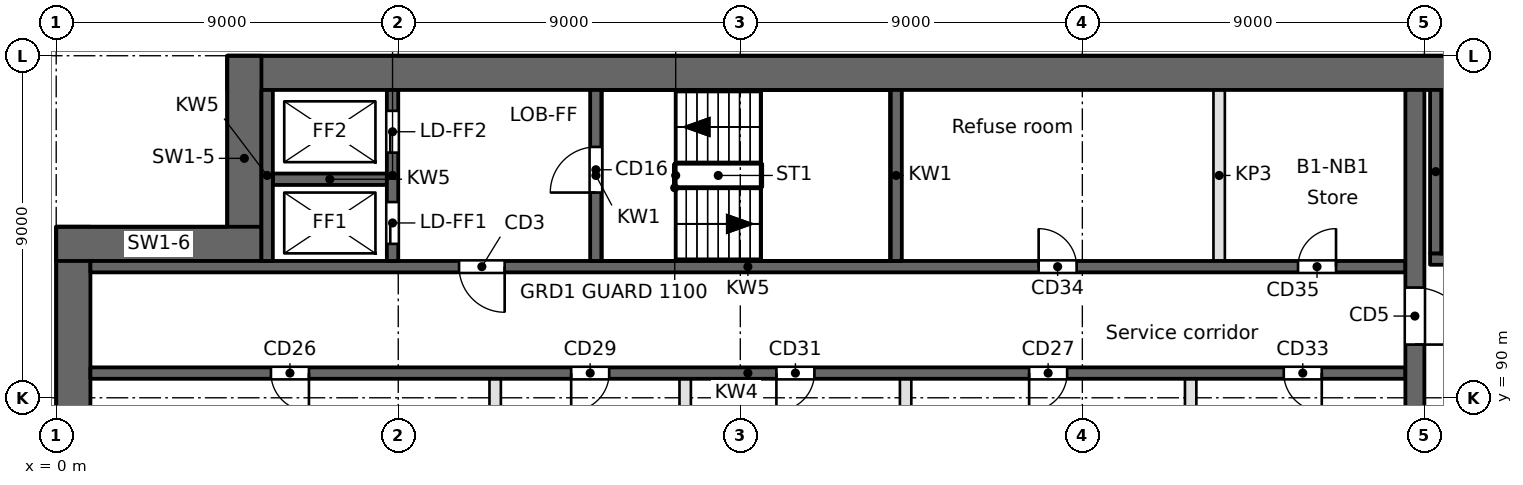
"""IFC4 building model, lengths in metres.
Left out: names, types, materials, properties, quantities, classifications, styles, units other than length and angle.
Written with IfcOpenShell. Run it as: python <this file> out.ifc"""

import sys

from ifc_helpers import new_model, si_unit, direction, frame, frame_2d, origin, place, context, subcontext, project, spatial, rectangle, extrude, element, fill, save


model = new_model("IFC4")
c1 = context("Model", 3, precision=1e-05, world=origin(), true_north=direction((0.0, 1.0)))
c2 = subcontext(c1, "Body", "Model", "MODEL_VIEW")
j1 = project(units=[si_unit("LENGTHUNIT", "METRE"), si_unit("PLANEANGLEUNIT", "RADIAN")], contexts=[c1])
p1 = place(None, origin())
s1 = spatial("IfcSite", under=j1, at=p1, CompositionType="ELEMENT")
p2 = place(p1, origin())
s2 = spatial("IfcBuilding", under=s1, at=p2, CompositionType="ELEMENT")
p3 = place(p2, frame((0.0, 0.0, -6.0)))
s3 = spatial("IfcBuildingStorey", under=s2, at=p3, CompositionType="ELEMENT", Elevation=-6.0)
p4 = place(p3, frame((0.45, 94.5, 0.0), z_axis=(0.0, 0.0, 1.0), x_axis=(0.0, -1.0, 0.0)))
e1 = element("IfcWall", 1, at=p4, inside=s3, PredefinedType="SHEAR", context=c2, shape_type="SweptSolid", body=[
    extrude(rectangle(XDim=66.085, YDim=0.9, at=frame_2d((33.042, 0.0))), origin(), (0.0, 0.0, 1.0), 6.0),
])
p5 = place(p3, frame((94.5, 98.55, 0.0), z_axis=(0.0, 0.0, 1.0), x_axis=(-1.0, 0.0, 0.0)))
e2 = element("IfcWall", 2, at=p5, inside=s3, PredefinedType="SHEAR", context=c2, shape_type="SweptSolid", body=[
    extrude(rectangle(XDim=90.0, YDim=0.9, at=frame_2d((45.0, 0.0))), origin(), (0.0, 0.0, 1.0), 6.0),
])
for number, where, z_axis, x_axis in (
    (3, (4.95, 99.0, 0.0), (0.0, 0.0, 1.0), (0.0, -1.0, 0.0)),
    (4, (5.4, 94.05, 0.0), (0.0, 0.0, 1.0), (-1.0, 0.0, 0.0)),
):
    element("IfcWall", number, at=place(p3, frame(where, z_axis=z_axis, x_axis=x_axis)), inside=s3, PredefinedType="SHEAR", context=c2, shape_type="SweptSolid", body=[
        extrude(rectangle(XDim=5.4, YDim=0.9, at=frame_2d((2.7, 0.0))), origin(), (0.0, 0.0, 1.0), 6.0),
    ])
p6 = place(p3, frame((0.9, 90.65, 0.0), z_axis=(0.0, 0.0, 1.0), x_axis=(1.0, 0.0, 0.0)))
e5 = element("IfcWall", 5, at=p6, inside=s3, PredefinedType="SOLIDWALL", context=c2, shape_type="SweptSolid", body=[
    extrude(rectangle(XDim=34.6, YDim=0.3, at=frame_2d((17.3, 0.0))), origin(), (0.0, 0.0, 1.0), 5.6),
])
p7 = place(p6, frame((4.75, 0.0, 0.0)))
e6 = element("IfcOpeningElement", 6, at=p7, cuts=e5, PredefinedType="OPENING", context=c2, shape_type="SweptSolid", body=[
    extrude(rectangle(XDim=1.0, YDim=2.1, at=frame_2d((0.5, 1.05))), frame((0.0, 0.15, 0.0), z_axis=(0.0, -1.0, 0.0), x_axis=(1.0, 0.0, 0.0)), (0.0, 0.0, 1.0), 0.3),
])
p8 = place(p6, frame((24.7, 0.0, 0.0)))
e7 = element("IfcOpeningElement", 7, at=p8, cuts=e5, PredefinedType="OPENING", context=c2, shape_type="SweptSolid", body=[
    extrude(rectangle(XDim=1.0, YDim=2.1, at=frame_2d((0.5, 1.05))), frame((0.0, 0.15, 0.0), z_axis=(0.0, -1.0, 0.0), x_axis=(1.0, 0.0, 0.0)), (0.0, 0.0, 1.0), 0.3),
])
p9 = place(p6, frame((12.65, 0.0, 0.0)))
e8 = element("IfcOpeningElement", 8, at=p9, cuts=e5, PredefinedType="OPENING", context=c2, shape_type="SweptSolid", body=[
    extrude(rectangle(XDim=1.0, YDim=2.1, at=frame_2d((0.5, 1.05))), frame((0.0, 0.15, 0.0), z_axis=(0.0, -1.0, 0.0), x_axis=(1.0, 0.0, 0.0)), (0.0, 0.0, 1.0), 0.3),
])
p10 = place(p6, frame((18.05, 0.0, 0.0)))
e9 = element("IfcOpeningElement", 9, at=p10, cuts=e5, PredefinedType="OPENING", context=c2, shape_type="SweptSolid", body=[
    extrude(rectangle(XDim=1.0, YDim=2.1, at=frame_2d((0.5, 1.05))), frame((0.0, 0.15, 0.0), z_axis=(0.0, -1.0, 0.0), x_axis=(1.0, 0.0, 0.0)), (0.0, 0.0, 1.0), 0.3),
])
p11 = place(p6, frame((31.4, 0.0, 0.0)))
e10 = element("IfcOpeningElement", 10, at=p11, cuts=e5, PredefinedType="OPENING", context=c2, shape_type="SweptSolid", body=[
    extrude(rectangle(XDim=1.0, YDim=2.1, at=frame_2d((0.5, 1.05))), frame((0.0, 0.15, 0.0), z_axis=(0.0, -1.0, 0.0), x_axis=(1.0, 0.0, 0.0)), (0.0, 0.0, 1.0), 0.3),
])
p12 = place(p3, frame((0.9, 93.45, 0.0), z_axis=(0.0, 0.0, 1.0), x_axis=(1.0, 0.0, 0.0)))
e11 = element("IfcWall", 11, at=p12, inside=s3, PredefinedType="SOLIDWALL", context=c2, shape_type="SweptSolid", body=[
    extrude(rectangle(XDim=34.6, YDim=0.3, at=frame_2d((17.3, 0.0))), origin(), (0.0, 0.0, 1.0), 5.6),
])
p13 = place(p12, frame((9.7, 0.0, 0.0)))
e12 = element("IfcOpeningElement", 12, at=p13, cuts=e11, PredefinedType="OPENING", context=c2, shape_type="SweptSolid", body=[
    extrude(rectangle(XDim=1.2, YDim=2.1, at=frame_2d((0.6, 1.05))), frame((0.0, 0.15, 0.0), z_axis=(0.0, -1.0, 0.0), x_axis=(1.0, 0.0, 0.0)), (0.0, 0.0, 1.0), 0.3),
])
p14 = place(p12, frame((24.95, 0.0, 0.0)))
e13 = element("IfcOpeningElement", 13, at=p14, cuts=e11, PredefinedType="OPENING", context=c2, shape_type="SweptSolid", body=[
    extrude(rectangle(XDim=1.0, YDim=2.1, at=frame_2d((0.5, 1.05))), frame((0.0, 0.15, 0.0), z_axis=(0.0, -1.0, 0.0), x_axis=(1.0, 0.0, 0.0)), (0.0, 0.0, 1.0), 0.3),
])
p15 = place(p12, frame((31.775, 0.0, 0.0)))
e14 = element("IfcOpeningElement", 14, at=p15, cuts=e11, PredefinedType="OPENING", context=c2, shape_type="SweptSolid", body=[
    extrude(rectangle(XDim=1.0, YDim=2.1, at=frame_2d((0.5, 1.05))), frame((0.0, 0.15, 0.0), z_axis=(0.0, -1.0, 0.0), x_axis=(1.0, 0.0, 0.0)), (0.0, 0.0, 1.0), 0.3),
])
p16 = place(p3, frame((36.15, 93.65, 0.0), z_axis=(0.0, 0.0, 1.0), x_axis=(1.0, 0.0, 0.0)))
e15 = element("IfcWall", 15, at=p16, inside=s3, PredefinedType="SOLIDWALL", context=c2, shape_type="SweptSolid", body=[
    extrude(rectangle(XDim=8.2, YDim=0.3, at=frame_2d((4.1, 0.0))), origin(), (0.0, 0.0, 1.0), 5.6),
])
p17 = place(p16, frame((0.7, 0.0, 0.0)))
e16 = element("IfcOpeningElement", 16, at=p17, cuts=e15, PredefinedType="OPENING", context=c2, shape_type="SweptSolid", body=[
    extrude(rectangle(XDim=1.2, YDim=2.1, at=frame_2d((0.6, 1.05))), frame((0.0, 0.15, 0.0), z_axis=(0.0, -1.0, 0.0), x_axis=(1.0, 0.0, 0.0)), (0.0, 0.0, 1.0), 0.3),
])
p18 = place(p3, frame((5.7, 95.75, 0.0), z_axis=(0.0, 0.0, 1.0), x_axis=(1.0, 0.0, 0.0)))
e17 = element("IfcWall", 17, at=p18, inside=s3, PredefinedType="SOLIDWALL", context=c2, shape_type="SweptSolid", body=[
    extrude(rectangle(XDim=3.0, YDim=0.3, at=frame_2d((1.5, 0.0))), origin(), (0.0, 0.0, 1.0), 5.6),
])
p19 = place(p3, frame((5.55, 93.6, 0.0), z_axis=(0.0, 0.0, 1.0), x_axis=(0.0, 1.0, 0.0)))
e18 = element("IfcWall", 18, at=p19, inside=s3, PredefinedType="SOLIDWALL", context=c2, shape_type="SweptSolid", body=[
    extrude(rectangle(XDim=4.5, YDim=0.3, at=frame_2d((2.25, 0.0))), origin(), (0.0, 0.0, 1.0), 5.6),
])
p20 = place(p3, frame((8.85, 93.6, 0.0), z_axis=(0.0, 0.0, 1.0), x_axis=(0.0, 1.0, 0.0)))
e19 = element("IfcWall", 19, at=p20, inside=s3, PredefinedType="SOLIDWALL", context=c2, shape_type="SweptSolid", body=[
    extrude(rectangle(XDim=4.5, YDim=0.3, at=frame_2d((2.25, 0.0))), origin(), (0.0, 0.0, 1.0), 5.6),
])
p21 = place(p20, frame((0.45, 0.0, 0.0)))
e20 = element("IfcOpeningElement", 20, at=p21, cuts=e19, PredefinedType="OPENING", context=c2, shape_type="SweptSolid", body=[
    extrude(rectangle(XDim=1.1, YDim=2.1, at=frame_2d((0.55, 1.05))), frame((0.0, 0.15, 0.0), z_axis=(0.0, -1.0, 0.0), x_axis=(1.0, 0.0, 0.0)), (0.0, 0.0, 1.0), 0.3),
])
p22 = place(p20, frame((2.85, 0.0, 0.0)))
e21 = element("IfcOpeningElement", 21, at=p22, cuts=e19, PredefinedType="OPENING", context=c2, shape_type="SweptSolid", body=[
    extrude(rectangle(XDim=1.1, YDim=2.1, at=frame_2d((0.55, 1.05))), frame((0.0, 0.15, 0.0), z_axis=(0.0, -1.0, 0.0), x_axis=(1.0, 0.0, 0.0)), (0.0, 0.0, 1.0), 0.3),
])
p23 = place(p3, frame((11.55, 87.95, 0.0), z_axis=(0.0, 0.0, 1.0), x_axis=(0.0, 1.0, 0.0)))
e22 = element("IfcWall", 22, at=p23, inside=s3, PredefinedType="PARTITIONING", context=c2, shape_type="SweptSolid", body=[
    extrude(rectangle(XDim=2.55, YDim=0.3, at=frame_2d((1.275, 0.0))), origin(), (0.0, 0.0, 1.0), 5.6),
])
p24 = place(p3, frame((14.2, 93.6, 0.0), z_axis=(0.0, 0.0, 1.0), x_axis=(0.0, 1.0, 0.0)))
e23 = element("IfcWall", 23, at=p24, inside=s3, PredefinedType="SOLIDWALL", context=c2, shape_type="SweptSolid", body=[
    extrude(rectangle(XDim=4.5, YDim=0.3, at=frame_2d((2.25, 0.0))), origin(), (0.0, 0.0, 1.0), 5.6),
])
p25 = place(p24, frame((1.8, 0.0, 0.0)))
e24 = element("IfcOpeningElement", 24, at=p25, cuts=e23, PredefinedType="OPENING", context=c2, shape_type="SweptSolid", body=[
    extrude(rectangle(XDim=1.2, YDim=2.1, at=frame_2d((0.6, 1.05))), frame((0.0, 0.15, 0.0), z_axis=(0.0, -1.0, 0.0), x_axis=(1.0, 0.0, 0.0)), (0.0, 0.0, 1.0), 0.3),
])
p26 = place(p3, frame((16.55, 77.55, 0.0), z_axis=(0.0, 0.0, 1.0), x_axis=(0.0, 1.0, 0.0)))
e25 = element("IfcWall", 25, at=p26, inside=s3, PredefinedType="PARTITIONING", context=c2, shape_type="SweptSolid", body=[
    extrude(rectangle(XDim=12.95, YDim=0.3, at=frame_2d((6.475, 0.0))), origin(), (0.0, 0.0, 1.0), 5.6),
])
p27 = place(p3, frame((22.1, 93.6, 0.0), z_axis=(0.0, 0.0, 1.0), x_axis=(0.0, 1.0, 0.0)))
e26 = element("IfcWall", 26, at=p27, inside=s3, PredefinedType="SOLIDWALL", context=c2, shape_type="SweptSolid", body=[
    extrude(rectangle(XDim=4.5, YDim=0.3, at=frame_2d((2.25, 0.0))), origin(), (0.0, 0.0, 1.0), 5.6),
])
for number, where, z_axis, x_axis in (
    (27, (22.35, 87.95, 0.0), (0.0, 0.0, 1.0), (0.0, 1.0, 0.0)),
    (28, (29.85, 87.95, 0.0), (0.0, 0.0, 1.0), (0.0, 1.0, 0.0)),
):
    element("IfcWall", number, at=place(p3, frame(where, z_axis=z_axis, x_axis=x_axis)), inside=s3, PredefinedType="PARTITIONING", context=c2, shape_type="SweptSolid", body=[
        extrude(rectangle(XDim=2.55, YDim=0.3, at=frame_2d((1.275, 0.0))), origin(), (0.0, 0.0, 1.0), 5.6),
    ])
p28 = place(p3, frame((30.6, 93.6, 0.0), z_axis=(0.0, 0.0, 1.0), x_axis=(0.0, 1.0, 0.0)))
e29 = element("IfcWall", 29, at=p28, inside=s3, PredefinedType="PARTITIONING", context=c2, shape_type="SweptSolid", body=[
    extrude(rectangle(XDim=4.5, YDim=0.3, at=frame_2d((2.25, 0.0))), origin(), (0.0, 0.0, 1.0), 5.6),
])
p29 = place(p3, frame((35.75, 63.5, 0.0), z_axis=(0.0, 0.0, 1.0), x_axis=(0.0, 1.0, 0.0)))
e30 = element("IfcWall", 30, at=p29, inside=s3, PredefinedType="SOLIDWALL", context=c2, shape_type="SweptSolid", body=[
    extrude(rectangle(XDim=34.6, YDim=0.5, at=frame_2d((17.3, 0.0))), origin(), (0.0, 0.0, 1.0), 5.6),
])
p30 = place(p29, frame((9.7, 0.0, 0.0)))
e31 = element("IfcOpeningElement", 31, at=p30, cuts=e30, PredefinedType="OPENING", context=c2, shape_type="SweptSolid", body=[
    extrude(rectangle(XDim=2.4, YDim=2.1, at=frame_2d((1.2, 1.05))), frame((0.0, 0.25, 0.0), z_axis=(0.0, -1.0, 0.0), x_axis=(1.0, 0.0, 0.0)), (0.0, 0.0, 1.0), 0.5),
])
p31 = place(p29, frame((27.9, 0.0, 0.0)))
e32 = element("IfcOpeningElement", 32, at=p31, cuts=e30, PredefinedType="OPENING", context=c2, shape_type="SweptSolid", body=[
    extrude(rectangle(XDim=1.5, YDim=2.1, at=frame_2d((0.75, 1.05))), frame((0.0, 0.25, 0.0), z_axis=(0.0, -1.0, 0.0), x_axis=(1.0, 0.0, 0.0)), (0.0, 0.0, 1.0), 0.5),
])
p32 = place(p29, frame((1.5, 0.0, 0.0)))
e33 = element("IfcOpeningElement", 33, at=p32, cuts=e30, PredefinedType="OPENING", context=c2, shape_type="SweptSolid", body=[
    extrude(rectangle(XDim=1.2, YDim=2.1, at=frame_2d((0.6, 1.05))), frame((0.0, 0.25, 0.0), z_axis=(0.0, -1.0, 0.0), x_axis=(1.0, 0.0, 0.0)), (0.0, 0.0, 1.0), 0.5),
])
p33 = place(p3, frame((36.3, 93.8, 0.0), z_axis=(0.0, 0.0, 1.0), x_axis=(0.0, 1.0, 0.0)))
e34 = element("IfcWall", 34, at=p33, inside=s3, PredefinedType="SOLIDWALL", context=c2, shape_type="SweptSolid", body=[
    extrude(rectangle(XDim=4.3, YDim=0.3, at=frame_2d((2.15, 0.0))), origin(), (0.0, 0.0, 1.0), 5.6),
])
p34 = place(p21, origin())
e35 = element("IfcDoor", 35, at=p34, inside=s3, OperationType="SLIDING_TO_RIGHT", PredefinedType="DOOR", context=c2, shape_type="SweptSolid", body=[
    extrude(rectangle(XDim=1.1, YDim=2.1, at=frame_2d((0.55, 1.05))), frame((0.0, 0.025, 0.0), z_axis=(0.0, -1.0, 0.0), x_axis=(1.0, 0.0, 0.0)), (0.0, 0.0, 1.0), 0.05),
])
fill(e20, e35)
p35 = place(p22, origin())
e36 = element("IfcDoor", 36, at=p35, inside=s3, OperationType="SLIDING_TO_LEFT", PredefinedType="DOOR", context=c2, shape_type="SweptSolid", body=[
    extrude(rectangle(XDim=1.1, YDim=2.1, at=frame_2d((0.55, 1.05))), frame((0.0, 0.025, 0.0), z_axis=(0.0, -1.0, 0.0), x_axis=(1.0, 0.0, 0.0)), (0.0, 0.0, 1.0), 0.05),
])
fill(e21, e36)
p36 = place(p13, frame((1.2, 0.0, 0.0), z_axis=(0.0, 0.0, 1.0), x_axis=(-1.0, 0.0, 0.0)))
e37 = element("IfcDoor", 37, at=p36, inside=s3, OperationType="SINGLE_SWING_LEFT", PredefinedType="DOOR", context=c2, shape_type="SweptSolid", body=[
    extrude(rectangle(XDim=1.2, YDim=2.1, at=frame_2d((0.6, 1.05))), frame((0.0, 0.025, 0.0), z_axis=(0.0, -1.0, 0.0), x_axis=(1.0, 0.0, 0.0)), (0.0, 0.0, 1.0), 0.05),
])
fill(e12, e37)
p37 = place(p31, frame((1.5, 0.0, 0.0), z_axis=(0.0, 0.0, 1.0), x_axis=(-1.0, 0.0, 0.0)))
e38 = element("IfcDoor", 38, at=p37, inside=s3, OperationType="SINGLE_SWING_RIGHT", PredefinedType="DOOR", context=c2, shape_type="SweptSolid", body=[
    extrude(rectangle(XDim=1.5, YDim=2.1, at=frame_2d((0.75, 1.05))), frame((0.0, 0.025, 0.0), z_axis=(0.0, -1.0, 0.0), x_axis=(1.0, 0.0, 0.0)), (0.0, 0.0, 1.0), 0.05),
])
fill(e32, e38)
p38 = place(p25, origin())
e39 = element("IfcDoor", 39, at=p38, inside=s3, OperationType="SINGLE_SWING_LEFT", PredefinedType="DOOR", context=c2, shape_type="SweptSolid", body=[
    extrude(rectangle(XDim=1.2, YDim=2.1, at=frame_2d((0.6, 1.05))), frame((0.0, 0.025, 0.0), z_axis=(0.0, -1.0, 0.0), x_axis=(1.0, 0.0, 0.0)), (0.0, 0.0, 1.0), 0.05),
])
fill(e24, e39)
p39 = place(p7, frame((1.0, 0.0, 0.0), z_axis=(0.0, 0.0, 1.0), x_axis=(-1.0, 0.0, 0.0)))
e40 = element("IfcDoor", 40, at=p39, inside=s3, OperationType="SINGLE_SWING_LEFT", PredefinedType="DOOR", context=c2, shape_type="SweptSolid", body=[
    extrude(rectangle(XDim=1.0, YDim=2.1, at=frame_2d((0.5, 1.05))), frame((0.0, 0.025, 0.0), z_axis=(0.0, -1.0, 0.0), x_axis=(1.0, 0.0, 0.0)), (0.0, 0.0, 1.0), 0.05),
])
fill(e6, e40)
p40 = place(p8, frame((1.0, 0.0, 0.0), z_axis=(0.0, 0.0, 1.0), x_axis=(-1.0, 0.0, 0.0)))
e41 = element("IfcDoor", 41, at=p40, inside=s3, OperationType="SINGLE_SWING_RIGHT", PredefinedType="DOOR", context=c2, shape_type="SweptSolid", body=[
    extrude(rectangle(XDim=1.0, YDim=2.1, at=frame_2d((0.5, 1.05))), frame((0.0, 0.025, 0.0), z_axis=(0.0, -1.0, 0.0), x_axis=(1.0, 0.0, 0.0)), (0.0, 0.0, 1.0), 0.05),
])
fill(e7, e41)
p41 = place(p9, frame((1.0, 0.0, 0.0), z_axis=(0.0, 0.0, 1.0), x_axis=(-1.0, 0.0, 0.0)))
e42 = element("IfcDoor", 42, at=p41, inside=s3, OperationType="SINGLE_SWING_RIGHT", PredefinedType="DOOR", context=c2, shape_type="SweptSolid", body=[
    extrude(rectangle(XDim=1.0, YDim=2.1, at=frame_2d((0.5, 1.05))), frame((0.0, 0.025, 0.0), z_axis=(0.0, -1.0, 0.0), x_axis=(1.0, 0.0, 0.0)), (0.0, 0.0, 1.0), 0.05),
])
fill(e8, e42)
p42 = place(p10, frame((1.0, 0.0, 0.0), z_axis=(0.0, 0.0, 1.0), x_axis=(-1.0, 0.0, 0.0)))
e43 = element("IfcDoor", 43, at=p42, inside=s3, OperationType="SINGLE_SWING_RIGHT", PredefinedType="DOOR", context=c2, shape_type="SweptSolid", body=[
    extrude(rectangle(XDim=1.0, YDim=2.1, at=frame_2d((0.5, 1.05))), frame((0.0, 0.025, 0.0), z_axis=(0.0, -1.0, 0.0), x_axis=(1.0, 0.0, 0.0)), (0.0, 0.0, 1.0), 0.05),
])
fill(e9, e43)
p43 = place(p11, frame((1.0, 0.0, 0.0), z_axis=(0.0, 0.0, 1.0), x_axis=(-1.0, 0.0, 0.0)))
e44 = element("IfcDoor", 44, at=p43, inside=s3, OperationType="SINGLE_SWING_LEFT", PredefinedType="DOOR", context=c2, shape_type="SweptSolid", body=[
    extrude(rectangle(XDim=1.0, YDim=2.1, at=frame_2d((0.5, 1.05))), frame((0.0, 0.025, 0.0), z_axis=(0.0, -1.0, 0.0), x_axis=(1.0, 0.0, 0.0)), (0.0, 0.0, 1.0), 0.05),
])
fill(e10, e44)
p44 = place(p14, origin())
e45 = element("IfcDoor", 45, at=p44, inside=s3, OperationType="SINGLE_SWING_LEFT", PredefinedType="DOOR", context=c2, shape_type="SweptSolid", body=[
    extrude(rectangle(XDim=1.0, YDim=2.1, at=frame_2d((0.5, 1.05))), frame((0.0, 0.025, 0.0), z_axis=(0.0, -1.0, 0.0), x_axis=(1.0, 0.0, 0.0)), (0.0, 0.0, 1.0), 0.05),
])
fill(e13, e45)
p45 = place(p15, origin())
e46 = element("IfcDoor", 46, at=p45, inside=s3, OperationType="SINGLE_SWING_RIGHT", PredefinedType="DOOR", context=c2, shape_type="SweptSolid", body=[
    extrude(rectangle(XDim=1.0, YDim=2.1, at=frame_2d((0.5, 1.05))), frame((0.0, 0.025, 0.0), z_axis=(0.0, -1.0, 0.0), x_axis=(1.0, 0.0, 0.0)), (0.0, 0.0, 1.0), 0.05),
])
fill(e14, e46)
save(model, sys.argv[1])
